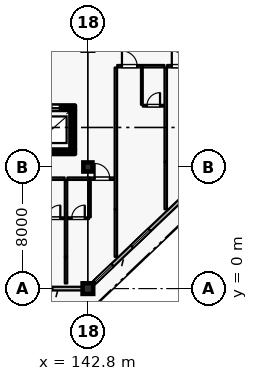
"""IFC4 building model, lengths in metres.
Left out: names, types, materials, properties, quantities, classifications, styles, units other than length and angle.
Written with IfcOpenShell. Run it as: python <this file> out.ifc"""

import sys

from ifc_helpers import new_model, si_unit, direction, frame, frame_2d, origin, origin_2d, place, context, subcontext, project, spatial, rectangle, extrude, element, fill, save


model = new_model("IFC4")
c1 = context("Model", 3, precision=1e-05, world=origin(), true_north=direction((0.0, 1.0)))
c2 = subcontext(c1, "Body", "Model", "MODEL_VIEW")
j1 = project(units=[si_unit("LENGTHUNIT", "METRE"), si_unit("PLANEANGLEUNIT", "RADIAN")], contexts=[c1])
p1 = place(None, origin())
s1 = spatial("IfcSite", under=j1, at=p1, CompositionType="ELEMENT")
p2 = place(p1, origin())
s2 = spatial("IfcBuilding", under=s1, at=p2, CompositionType="ELEMENT")
p3 = place(p2, frame((0.0, 0.0, 36.0)))
s3 = spatial("IfcBuildingStorey", under=s2, at=p3, CompositionType="ELEMENT", Elevation=36.0)
p4 = place(p3, frame((142.8, 0.0, 0.0), z_axis=(0.0, 0.0, 1.0), x_axis=(1.0, 0.0, 0.0)))
e1 = element("IfcColumn", 1, at=p4, inside=s3, PredefinedType="COLUMN", context=c2, shape_type="SweptSolid", body=[
    extrude(rectangle(XDim=0.7, YDim=0.7, at=origin_2d()), origin(), (0.0, 0.0, 1.0), 3.6),
])
p5 = place(p3, frame((142.8, 8.0, 0.0), z_axis=(0.0, 0.0, 1.0), x_axis=(1.0, 0.0, 0.0)))
e2 = element("IfcColumn", 2, at=p5, inside=s3, PredefinedType="COLUMN", context=c2, shape_type="SweptSolid", body=[
    extrude(rectangle(XDim=0.6, YDim=0.6, at=origin_2d()), origin(), (0.0, 0.0, 1.0), 3.6),
])
p6 = place(p3, frame((142.45, 0.0, 0.0), z_axis=(0.0, 0.0, 1.0), x_axis=(-1.0, 0.0, 0.0)))
e3 = element("IfcWall", 3, at=p6, inside=s3, PredefinedType="SOLIDWALL", context=c2, shape_type="SweptSolid", body=[
    extrude(rectangle(XDim=7.7, YDim=0.24, at=frame_2d((3.85, 0.0))), origin(), (0.0, 0.0, 1.0), 2.94),
])
p7 = place(p6, frame((1.98, 0.0, 0.0)))
e4 = element("IfcOpeningElement", 4, at=p7, cuts=e3, PredefinedType="OPENING", context=c2, shape_type="SweptSolid", body=[
    extrude(rectangle(XDim=1.5, YDim=2.25, at=frame_2d((0.75, 1.125))), frame((0.0, 0.13, 0.0), z_axis=(0.0, -1.0, 0.0), x_axis=(1.0, 0.0, 0.0)), (0.0, 0.0, 1.0), 0.26),
])
p8 = place(p6, frame((5.21, 0.0, 0.8)))
e5 = element("IfcOpeningElement", 5, at=p8, cuts=e3, PredefinedType="OPENING", context=c2, shape_type="SweptSolid", body=[
    extrude(rectangle(XDim=1.6, YDim=1.6, at=frame_2d((0.8, 0.8))), frame((0.0, 0.13, 0.0), z_axis=(0.0, -1.0, 0.0), x_axis=(1.0, 0.0, 0.0)), (0.0, 0.0, 1.0), 0.26),
])
p9 = place(p3, frame((150.85, 7.667, 0.0), z_axis=(0.0, 0.0, 1.0), x_axis=(-0.724116091282, -0.689678103427, 0.0)))
e6 = element("IfcWall", 6, at=p9, inside=s3, PredefinedType="SOLIDWALL", context=c2, shape_type="SweptSolid", body=[
    extrude(rectangle(XDim=10.634, YDim=0.24, at=frame_2d((5.317, 0.0))), origin(), (0.0, 0.0, 1.0), 2.94),
])
p10 = place(p9, frame((1.204, 0.0, 0.0)))
e7 = element("IfcOpeningElement", 7, at=p10, cuts=e6, PredefinedType="OPENING", context=c2, shape_type="SweptSolid", body=[
    extrude(rectangle(XDim=1.5, YDim=2.25, at=frame_2d((0.75, 1.125))), frame((0.0, 0.13, 0.0), z_axis=(0.0, -1.0, 0.0), x_axis=(1.0, 0.0, 0.0)), (0.0, 0.0, 1.0), 0.26),
])
p11 = place(p9, frame((5.511, 0.0, 0.8)))
e8 = element("IfcOpeningElement", 8, at=p11, cuts=e6, PredefinedType="OPENING", context=c2, shape_type="SweptSolid", body=[
    extrude(rectangle(XDim=1.6, YDim=1.6, at=frame_2d((0.8, 0.8))), frame((0.0, 0.13, 0.0), z_axis=(0.0, -1.0, 0.0), x_axis=(1.0, 0.0, 0.0)), (0.0, 0.0, 1.0), 0.26),
])
p12 = place(p9, frame((8.874, 0.0, 0.8)))
e9 = element("IfcOpeningElement", 9, at=p12, cuts=e6, PredefinedType="OPENING", context=c2, shape_type="SweptSolid", body=[
    extrude(rectangle(XDim=1.6, YDim=1.6, at=frame_2d((0.8, 0.8))), frame((0.0, 0.13, 0.0), z_axis=(0.0, -1.0, 0.0), x_axis=(1.0, 0.0, 0.0)), (0.0, 0.0, 1.0), 0.26),
])
p13 = place(p3, frame((138.85, 9.0, 0.0), z_axis=(0.0, 0.0, 1.0), x_axis=(1.0, 0.0, 0.0)))
e10 = element("IfcWall", 10, at=p13, inside=s3, PredefinedType="SHEAR", context=c2, shape_type="SweptSolid", body=[
    extrude(rectangle(XDim=3.1, YDim=0.3, at=frame_2d((1.55, 0.0))), origin(), (0.0, 0.0, 1.0), 3.365),
])
p14 = place(p3, frame((141.8, 9.155, 0.0), z_axis=(0.0, 0.0, 1.0), x_axis=(0.0, 1.0, 0.0)))
e11 = element("IfcWall", 11, at=p14, inside=s3, PredefinedType="SHEAR", context=c2, shape_type="SweptSolid", body=[
    extrude(rectangle(XDim=2.59, YDim=0.3, at=frame_2d((1.295, 0.0))), origin(), (0.0, 0.0, 1.0), 3.365),
])
p15 = place(p3, frame((141.95, 11.9, 0.0), z_axis=(0.0, 0.0, 1.0), x_axis=(-1.0, 0.0, 0.0)))
e12 = element("IfcWall", 12, at=p15, inside=s3, PredefinedType="SHEAR", context=c2, shape_type="SweptSolid", body=[
    extrude(rectangle(XDim=3.1, YDim=0.3, at=frame_2d((1.55, 0.0))), origin(), (0.0, 0.0, 1.0), 3.365),
])
p16 = place(p15, frame((1.0, 0.0, 0.0)))
e13 = element("IfcOpeningElement", 13, at=p16, cuts=e12, PredefinedType="OPENING", context=c2, shape_type="SweptSolid", body=[
    extrude(rectangle(XDim=1.1, YDim=2.2, at=frame_2d((0.55, 1.1))), frame((0.0, 0.16, 0.0), z_axis=(0.0, -1.0, 0.0), x_axis=(1.0, 0.0, 0.0)), (0.0, 0.0, 1.0), 0.32),
])
p17 = place(p3, frame((139.8, 7.23, 0.0), z_axis=(0.0, 0.0, 1.0), x_axis=(1.0, 0.0, 0.0)))
e14 = element("IfcWall", 14, at=p17, inside=s3, PredefinedType="PARTITIONING", context=c2, shape_type="SweptSolid", body=[
    extrude(rectangle(XDim=1.47, YDim=0.16, at=frame_2d((0.735, 0.0))), origin(), (0.0, 0.0, 1.0), 3.365),
])
p18 = place(p3, frame((139.85, 4.63, 0.0), z_axis=(0.0, 0.0, 1.0), x_axis=(1.0, 0.0, 0.0)))
e15 = element("IfcWall", 15, at=p18, inside=s3, PredefinedType="PARTITIONING", context=c2, shape_type="SweptSolid", body=[
    extrude(rectangle(XDim=1.41, YDim=0.115, at=frame_2d((0.705, 0.0))), origin(), (0.0, 0.0, 1.0), 3.365),
])
p19 = place(p18, frame((0.275, 0.0, 0.0)))
e16 = element("IfcOpeningElement", 16, at=p19, cuts=e15, PredefinedType="OPENING", context=c2, shape_type="SweptSolid", body=[
    extrude(rectangle(XDim=0.86, YDim=2.12, at=frame_2d((0.43, 1.06))), frame((0.0, 0.067, 0.0), z_axis=(0.0, -1.0, 0.0), x_axis=(1.0, 0.0, 0.0)), (0.0, 0.0, 1.0), 0.135),
])
p20 = place(p3, frame((141.36, 0.34, 0.0), z_axis=(0.0, 0.0, 1.0), x_axis=(0.0, 1.0, 0.0)))
e17 = element("IfcWall", 17, at=p20, inside=s3, PredefinedType="PARTITIONING", context=c2, shape_type="SweptSolid", body=[
    extrude(rectangle(XDim=1.74, YDim=0.16, at=frame_2d((0.87, 0.0))), origin(), (0.0, 0.0, 1.0), 3.365),
])
p21 = place(p3, frame((141.45, 7.23, 0.0), z_axis=(0.0, 0.0, 1.0), x_axis=(1.0, 0.0, 0.0)))
e18 = element("IfcWall", 18, at=p21, inside=s3, PredefinedType="PARTITIONING", context=c2, shape_type="SweptSolid", body=[
    extrude(rectangle(XDim=1.47, YDim=0.16, at=frame_2d((0.735, 0.0))), origin(), (0.0, 0.0, 1.0), 3.365),
])
p22 = place(p3, frame((142.93, 7.23, 0.0), z_axis=(0.0, 0.0, 1.0), x_axis=(1.0, 0.0, 0.0)))
e19 = element("IfcWall", 19, at=p22, inside=s3, PredefinedType="PARTITIONING", context=c2, shape_type="SweptSolid", body=[
    extrude(rectangle(XDim=1.62, YDim=0.16, at=frame_2d((0.81, 0.0))), origin(), (0.0, 0.0, 1.0), 3.365),
])
p23 = place(p22, frame((0.31, 0.0, 0.0)))
e20 = element("IfcOpeningElement", 20, at=p23, cuts=e19, PredefinedType="OPENING", context=c2, shape_type="SweptSolid", body=[
    extrude(rectangle(XDim=1.0, YDim=2.25, at=frame_2d((0.5, 1.125))), frame((0.0, 0.09, 0.0), z_axis=(0.0, -1.0, 0.0), x_axis=(1.0, 0.0, 0.0)), (0.0, 0.0, 1.0), 0.18),
])
p24 = place(p3, frame((142.93, 4.69, 0.0), z_axis=(0.0, 0.0, 1.0), x_axis=(0.0, 1.0, 0.0)))
e21 = element("IfcWall", 21, at=p24, inside=s3, PredefinedType="PARTITIONING", context=c2, shape_type="SweptSolid", body=[
    extrude(rectangle(XDim=2.45, YDim=0.115, at=frame_2d((1.225, 0.0))), origin(), (0.0, 0.0, 1.0), 2.74),
])
p25 = place(p3, frame((141.46, 4.63, 0.0), z_axis=(0.0, 0.0, 1.0), x_axis=(1.0, 0.0, 0.0)))
e22 = element("IfcWall", 22, at=p25, inside=s3, PredefinedType="PARTITIONING", context=c2, shape_type="SweptSolid", body=[
    extrude(rectangle(XDim=1.41, YDim=0.115, at=frame_2d((0.705, 0.0))), origin(), (0.0, 0.0, 1.0), 3.365),
])
p26 = place(p25, frame((0.275, 0.0, 0.0)))
e23 = element("IfcOpeningElement", 23, at=p26, cuts=e22, PredefinedType="OPENING", context=c2, shape_type="SweptSolid", body=[
    extrude(rectangle(XDim=0.86, YDim=2.12, at=frame_2d((0.43, 1.06))), frame((0.0, 0.067, 0.0), z_axis=(0.0, -1.0, 0.0), x_axis=(1.0, 0.0, 0.0)), (0.0, 0.0, 1.0), 0.135),
])
p27 = place(p3, frame((141.36, 2.09, 0.0), z_axis=(0.0, 0.0, 1.0), x_axis=(0.0, 1.0, 0.0)))
e24 = element("IfcWall", 24, at=p27, inside=s3, PredefinedType="PARTITIONING", context=c2, shape_type="SweptSolid", body=[
    extrude(rectangle(XDim=5.05, YDim=0.16, at=frame_2d((2.525, 0.0))), origin(), (0.0, 0.0, 1.0), 3.365),
])
p28 = place(p3, frame((144.64, 2.09, 0.0), z_axis=(0.0, 0.0, 1.0), x_axis=(0.0, 1.0, 0.0)))
e25 = element("IfcWall", 25, at=p28, inside=s3, PredefinedType="PARTITIONING", context=c2, shape_type="SweptSolid", body=[
    extrude(rectangle(XDim=3.12, YDim=0.16, at=frame_2d((1.56, 0.0))), origin(), (0.0, 0.0, 1.0), 3.365),
])
p29 = place(p3, frame((144.73, 14.63, 0.0), z_axis=(0.0, 0.0, 1.0), x_axis=(1.0, 0.0, 0.0)))
e26 = element("IfcWall", 26, at=p29, inside=s3, PredefinedType="PARTITIONING", context=c2, shape_type="SweptSolid", body=[
    extrude(rectangle(XDim=1.62, YDim=0.16, at=frame_2d((0.81, 0.0))), origin(), (0.0, 0.0, 1.0), 3.365),
])
p30 = place(p29, frame((0.31, 0.0, 0.0)))
e27 = element("IfcOpeningElement", 27, at=p30, cuts=e26, PredefinedType="OPENING", context=c2, shape_type="SweptSolid", body=[
    extrude(rectangle(XDim=1.0, YDim=2.25, at=frame_2d((0.5, 1.125))), frame((0.0, 0.09, 0.0), z_axis=(0.0, -1.0, 0.0), x_axis=(1.0, 0.0, 0.0)), (0.0, 0.0, 1.0), 0.18),
])
p31 = place(p3, frame((146.36, 14.63, 0.0), z_axis=(0.0, 0.0, 1.0), x_axis=(1.0, 0.0, 0.0)))
e28 = element("IfcWall", 28, at=p31, inside=s3, PredefinedType="PARTITIONING", context=c2, shape_type="SweptSolid", body=[
    extrude(rectangle(XDim=1.47, YDim=0.16, at=frame_2d((0.735, 0.0))), origin(), (0.0, 0.0, 1.0), 3.365),
])
p32 = place(p3, frame((146.35, 12.09, 0.0), z_axis=(0.0, 0.0, 1.0), x_axis=(0.0, 1.0, 0.0)))
e29 = element("IfcWall", 29, at=p32, inside=s3, PredefinedType="PARTITIONING", context=c2, shape_type="SweptSolid", body=[
    extrude(rectangle(XDim=2.45, YDim=0.115, at=frame_2d((1.225, 0.0))), origin(), (0.0, 0.0, 1.0), 3.365),
])
p33 = place(p3, frame((146.41, 12.03, 0.0), z_axis=(0.0, 0.0, 1.0), x_axis=(1.0, 0.0, 0.0)))
e30 = element("IfcWall", 30, at=p33, inside=s3, PredefinedType="PARTITIONING", context=c2, shape_type="SweptSolid", body=[
    extrude(rectangle(XDim=1.41, YDim=0.115, at=frame_2d((0.705, 0.0))), origin(), (0.0, 0.0, 1.0), 3.365),
])
p34 = place(p33, frame((0.275, 0.0, 0.0)))
e31 = element("IfcOpeningElement", 31, at=p34, cuts=e30, PredefinedType="OPENING", context=c2, shape_type="SweptSolid", body=[
    extrude(rectangle(XDim=0.86, YDim=2.12, at=frame_2d((0.43, 1.06))), frame((0.0, 0.067, 0.0), z_axis=(0.0, -1.0, 0.0), x_axis=(1.0, 0.0, 0.0)), (0.0, 0.0, 1.0), 0.135),
])
p35 = place(p3, frame((144.64, 5.22, 0.0), z_axis=(0.0, 0.0, 1.0), x_axis=(0.0, 1.0, 0.0)))
e32 = element("IfcWall", 32, at=p35, inside=s3, PredefinedType="PARTITIONING", context=c2, shape_type="SweptSolid", body=[
    extrude(rectangle(XDim=9.32, YDim=0.16, at=frame_2d((4.66, 0.0))), origin(), (0.0, 0.0, 1.0), 3.365),
])
p36 = place(p3, frame((147.92, 5.22, 0.0), z_axis=(0.0, 0.0, 1.0), x_axis=(0.0, 1.0, 0.0)))
e33 = element("IfcWall", 33, at=p36, inside=s3, PredefinedType="PARTITIONING", context=c2, shape_type="SweptSolid", body=[
    extrude(rectangle(XDim=3.11, YDim=0.16, at=frame_2d((1.555, 0.0))), origin(), (0.0, 0.0, 1.0), 3.365),
])
p37 = place(p3, frame((148.01, 14.63, 0.0), z_axis=(0.0, 0.0, 1.0), x_axis=(1.0, 0.0, 0.0)))
e34 = element("IfcWall", 34, at=p37, inside=s3, PredefinedType="PARTITIONING", context=c2, shape_type="SweptSolid", body=[
    extrude(rectangle(XDim=1.62, YDim=0.16, at=frame_2d((0.81, 0.0))), origin(), (0.0, 0.0, 1.0), 3.365),
])
p38 = place(p37, frame((0.31, 0.0, 0.0)))
e35 = element("IfcOpeningElement", 35, at=p38, cuts=e34, PredefinedType="OPENING", context=c2, shape_type="SweptSolid", body=[
    extrude(rectangle(XDim=1.0, YDim=2.25, at=frame_2d((0.5, 1.125))), frame((0.0, 0.09, 0.0), z_axis=(0.0, -1.0, 0.0), x_axis=(1.0, 0.0, 0.0)), (0.0, 0.0, 1.0), 0.18),
])
p39 = place(p3, frame((147.92, 8.34, 0.0), z_axis=(0.0, 0.0, 1.0), x_axis=(0.0, 1.0, 0.0)))
e36 = element("IfcWall", 36, at=p39, inside=s3, PredefinedType="PARTITIONING", context=c2, shape_type="SweptSolid", body=[
    extrude(rectangle(XDim=6.2, YDim=0.16, at=frame_2d((3.1, 0.0))), origin(), (0.0, 0.0, 1.0), 3.365),
])
p40 = place(p11, origin())
e37 = element("IfcWindow", 37, at=p40, inside=s3, PartitioningType="SINGLE_PANEL", PredefinedType="WINDOW", context=c2, shape_type="SweptSolid", body=[
    extrude(rectangle(XDim=1.6, YDim=1.6, at=frame_2d((0.8, 0.8))), frame((0.0, 0.03, 0.0), z_axis=(0.0, -1.0, 0.0), x_axis=(1.0, 0.0, 0.0)), (0.0, 0.0, 1.0), 0.06),
])
fill(e8, e37)
p41 = place(p12, origin())
e38 = element("IfcWindow", 38, at=p41, inside=s3, PartitioningType="SINGLE_PANEL", PredefinedType="WINDOW", context=c2, shape_type="SweptSolid", body=[
    extrude(rectangle(XDim=1.6, YDim=1.6, at=frame_2d((0.8, 0.8))), frame((0.0, 0.03, 0.0), z_axis=(0.0, -1.0, 0.0), x_axis=(1.0, 0.0, 0.0)), (0.0, 0.0, 1.0), 0.06),
])
fill(e9, e38)
p42 = place(p16, origin())
e39 = element("IfcDoor", 39, at=p42, inside=s3, OperationType="DOUBLE_DOOR_SLIDING", PredefinedType="DOOR", context=c2, shape_type="SweptSolid", body=[
    extrude(rectangle(XDim=1.1, YDim=2.2, at=frame_2d((0.55, 1.1))), frame((0.0, 0.025, 0.0), z_axis=(0.0, -1.0, 0.0), x_axis=(1.0, 0.0, 0.0)), (0.0, 0.0, 1.0), 0.05),
])
fill(e13, e39)
p43 = place(p19, origin())
e40 = element("IfcDoor", 40, at=p43, inside=s3, OperationType="SINGLE_SWING_RIGHT", PredefinedType="DOOR", context=c2, shape_type="SweptSolid", body=[
    extrude(rectangle(XDim=0.86, YDim=2.12, at=frame_2d((0.43, 1.06))), frame((0.0, 0.025, 0.0), z_axis=(0.0, -1.0, 0.0), x_axis=(1.0, 0.0, 0.0)), (0.0, 0.0, 1.0), 0.05),
])
fill(e16, e40)
p44 = place(p23, origin())
e41 = element("IfcDoor", 41, at=p44, inside=s3, OperationType="SINGLE_SWING_LEFT", PredefinedType="DOOR", context=c2, shape_type="SweptSolid", body=[
    extrude(rectangle(XDim=1.0, YDim=2.25, at=frame_2d((0.5, 1.125))), frame((0.0, 0.025, 0.0), z_axis=(0.0, -1.0, 0.0), x_axis=(1.0, 0.0, 0.0)), (0.0, 0.0, 1.0), 0.05),
])
fill(e20, e41)
p45 = place(p26, origin())
e42 = element("IfcDoor", 42, at=p45, inside=s3, OperationType="SINGLE_SWING_RIGHT", PredefinedType="DOOR", context=c2, shape_type="SweptSolid", body=[
    extrude(rectangle(XDim=0.86, YDim=2.12, at=frame_2d((0.43, 1.06))), frame((0.0, 0.025, 0.0), z_axis=(0.0, -1.0, 0.0), x_axis=(1.0, 0.0, 0.0)), (0.0, 0.0, 1.0), 0.05),
])
fill(e23, e42)
p46 = place(p30, origin())
e43 = element("IfcDoor", 43, at=p46, inside=s3, OperationType="SINGLE_SWING_LEFT", PredefinedType="DOOR", context=c2, shape_type="SweptSolid", body=[
    extrude(rectangle(XDim=1.0, YDim=2.25, at=frame_2d((0.5, 1.125))), frame((0.0, 0.025, 0.0), z_axis=(0.0, -1.0, 0.0), x_axis=(1.0, 0.0, 0.0)), (0.0, 0.0, 1.0), 0.05),
])
fill(e27, e43)
p47 = place(p34, origin())
e44 = element("IfcDoor", 44, at=p47, inside=s3, OperationType="SINGLE_SWING_RIGHT", PredefinedType="DOOR", context=c2, shape_type="SweptSolid", body=[
    extrude(rectangle(XDim=0.86, YDim=2.12, at=frame_2d((0.43, 1.06))), frame((0.0, 0.025, 0.0), z_axis=(0.0, -1.0, 0.0), x_axis=(1.0, 0.0, 0.0)), (0.0, 0.0, 1.0), 0.05),
])
fill(e31, e44)
p48 = place(p38, origin())
e45 = element("IfcDoor", 45, at=p48, inside=s3, OperationType="SINGLE_SWING_LEFT", PredefinedType="DOOR", context=c2, shape_type="SweptSolid", body=[
    extrude(rectangle(XDim=1.0, YDim=2.25, at=frame_2d((0.5, 1.125))), frame((0.0, 0.025, 0.0), z_axis=(0.0, -1.0, 0.0), x_axis=(1.0, 0.0, 0.0)), (0.0, 0.0, 1.0), 0.05),
])
fill(e35, e45)
save(model, sys.argv[1])
